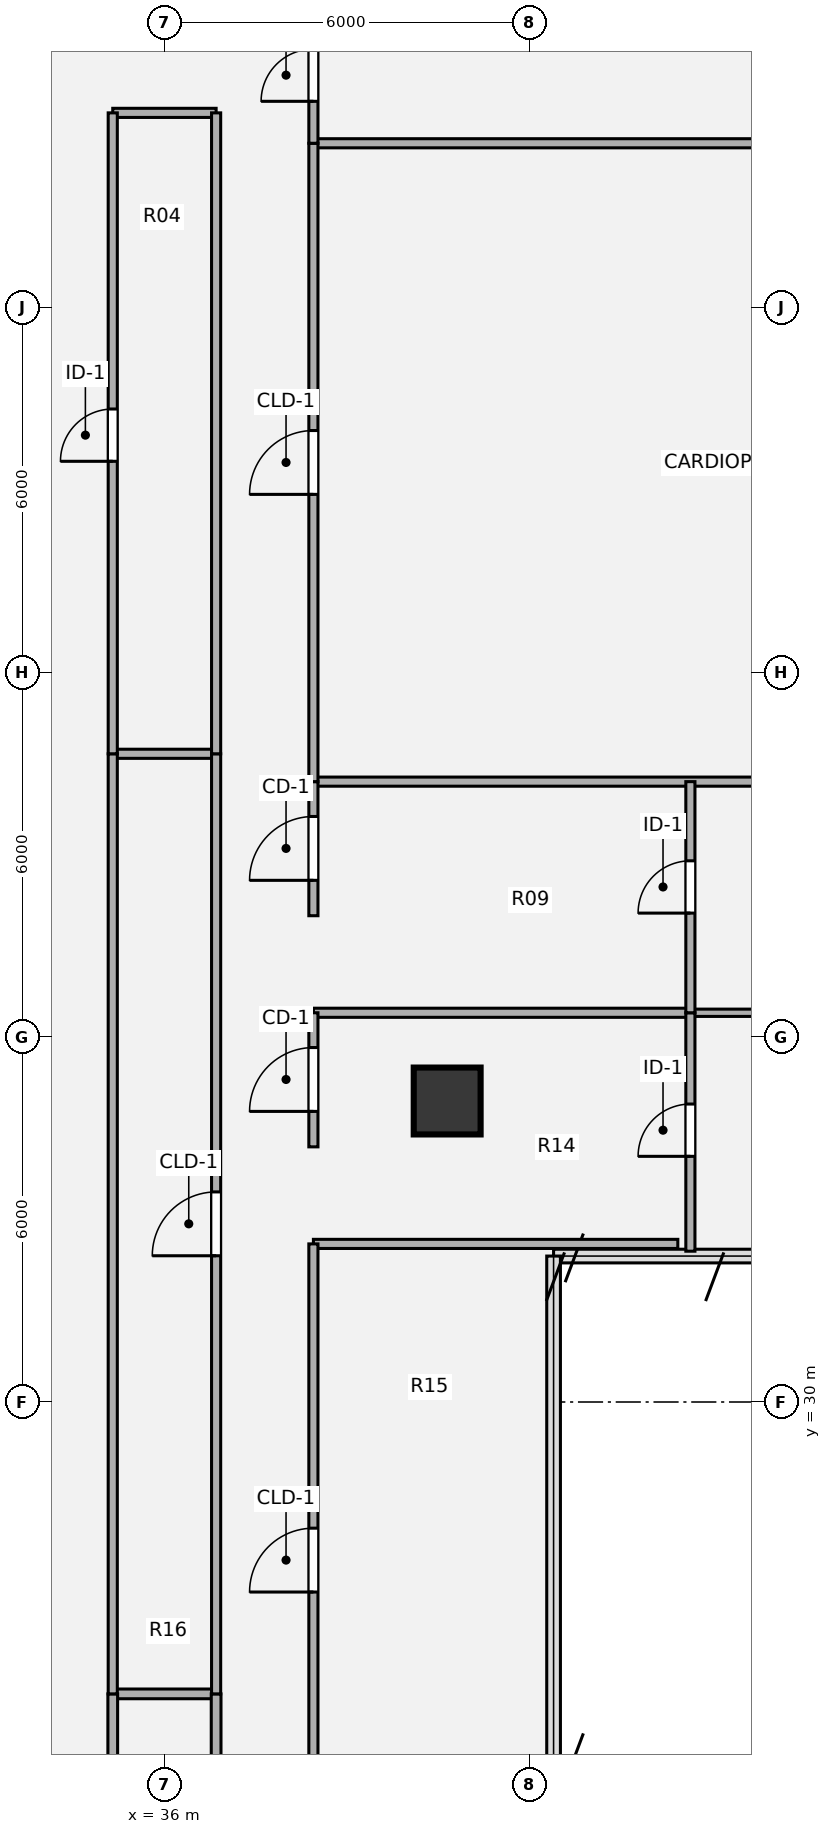
"""IFC4 building model, lengths in metres.
Left out: names, types, materials, properties, quantities, classifications, styles, units other than length and angle.
Written with IfcOpenShell. Run it as: python <this file> out.ifc"""

import sys

from ifc_helpers import new_model, si_unit, direction, frame, frame_2d, origin, origin_2d, place, context, subcontext, project, spatial, rectangle, hollow_circle, extrude, source, transform, mapped, element, fill, save


model = new_model("IFC4")
c1 = context("Model", 3, precision=1e-05, world=origin(), true_north=direction((0.0, 1.0)))
c2 = subcontext(c1, "Body", "Model", "MODEL_VIEW")
j1 = project(units=[si_unit("LENGTHUNIT", "METRE"), si_unit("PLANEANGLEUNIT", "RADIAN")], contexts=[c1])
p1 = place(None, origin())
s1 = spatial("IfcSite", under=j1, at=p1, CompositionType="ELEMENT")
p2 = place(p1, origin())
s2 = spatial("IfcBuilding", under=s1, at=p2, CompositionType="ELEMENT")
p3 = place(p2, frame((0.0, 0.0, 179.1)))
s3 = spatial("IfcBuildingStorey", under=s2, at=p3, CompositionType="ELEMENT", Elevation=179.1)
m1 = source(origin(), c2, "Body", "SweptSolid", [
    extrude(hollow_circle(Radius=0.55, WallThickness=0.04, at=origin_2d()), origin(), (0.0, 0.0, 1.0), 3.78),
])
p4 = place(p3, frame((40.65, 34.95, 0.0), z_axis=(0.0, 0.0, 1.0), x_axis=(1.0, 0.0, 0.0)))
e1 = element("IfcColumn", 1, at=p4, inside=s3, PredefinedType="COLUMN", context=c2, shape_type="MappedRepresentation", body=[
    mapped(m1, transform((0.0, 0.0, 0.0), x_axis=(1.0, 0.0, 0.0), y_axis=(0.0, 1.0, 0.0), z_axis=(0.0, 0.0, 1.0), scale=1.0)),
])
p5 = place(p3, frame((35.15, 25.2, 0.0), z_axis=(0.0, 0.0, 1.0), x_axis=(1.0, 0.0, 0.0)))
e2 = element("IfcWall", 2, at=p5, inside=s3, PredefinedType="PLUMBINGWALL", context=c2, shape_type="SweptSolid", body=[
    extrude(rectangle(XDim=1.7, YDim=0.16, at=frame_2d((0.85, 0.0))), origin(), (0.0, 0.0, 1.0), 3.5),
])
p6 = place(p3, frame((38.45, 32.6, 0.0), z_axis=(0.0, 0.0, 1.0), x_axis=(1.0, 0.0, 0.0)))
e3 = element("IfcWall", 3, at=p6, inside=s3, PredefinedType="PARTITIONING", context=c2, shape_type="SweptSolid", body=[
    extrude(rectangle(XDim=5.993, YDim=0.15, at=frame_2d((2.997, 0.0))), origin(), (0.0, 0.0, 1.0), 3.5),
])
p7 = place(p3, frame((38.45, 36.401, 0.0), z_axis=(0.0, 0.0, 1.0), x_axis=(1.0, 0.0, 0.0)))
e4 = element("IfcWall", 4, at=p7, inside=s3, PredefinedType="PARTITIONING", context=c2, shape_type="SweptSolid", body=[
    extrude(rectangle(XDim=6.2, YDim=0.15, at=frame_2d((3.1, 0.0))), origin(), (0.0, 0.0, 1.0), 2.982),
])
p8 = place(p3, frame((44.65, 36.401, 0.0), z_axis=(0.0, 0.0, 1.0), x_axis=(1.0, 0.0, 0.0)))
e5 = element("IfcWall", 5, at=p8, inside=s3, PredefinedType="PARTITIONING", context=c2, shape_type="SweptSolid", body=[
    extrude(rectangle(XDim=11.47, YDim=0.12, at=frame_2d((5.735, 0.0))), origin(), (0.0, 0.0, 1.0), 2.982),
])
p9 = place(p3, frame((38.45, 40.202, 0.0), z_axis=(0.0, 0.0, 1.0), x_axis=(1.0, 0.0, 0.0)))
e6 = element("IfcWall", 6, at=p9, inside=s3, PredefinedType="PARTITIONING", context=c2, shape_type="SweptSolid", body=[
    extrude(rectangle(XDim=17.67, YDim=0.15, at=frame_2d((8.835, 0.0))), origin(), (0.0, 0.0, 1.0), 2.982),
])
p10 = place(p3, frame((35.15, 40.66, 0.0), z_axis=(0.0, 0.0, 1.0), x_axis=(1.0, 0.0, 0.0)))
e7 = element("IfcWall", 7, at=p10, inside=s3, PredefinedType="PARTITIONING", context=c2, shape_type="SweptSolid", body=[
    extrude(rectangle(XDim=1.7, YDim=0.15, at=frame_2d((0.85, 0.0))), origin(), (0.0, 0.0, 1.0), 3.259),
])
p11 = place(p3, frame((38.45, 50.7, 0.0), z_axis=(0.0, 0.0, 1.0), x_axis=(1.0, 0.0, 0.0)))
e8 = element("IfcWall", 8, at=p11, inside=s3, PredefinedType="PARTITIONING", context=c2, shape_type="SweptSolid", body=[
    extrude(rectangle(XDim=17.569, YDim=0.15, at=frame_2d((8.785, 0.0))), origin(), (0.0, 0.0, 1.0), 3.308),
])
p12 = place(p3, frame((35.15, 51.2, 0.0), z_axis=(0.0, 0.0, 1.0), x_axis=(1.0, 0.0, 0.0)))
e9 = element("IfcWall", 9, at=p12, inside=s3, PredefinedType="PARTITIONING", context=c2, shape_type="SweptSolid", body=[
    extrude(rectangle(XDim=1.7, YDim=0.15, at=frame_2d((0.85, 0.0))), origin(), (0.0, 0.0, 1.0), 3.308),
])
p13 = place(p3, frame((35.15, 20.2, 0.0), z_axis=(0.0, 0.0, 1.0), x_axis=(0.0, 1.0, 0.0)))
e10 = element("IfcWall", 10, at=p13, inside=s3, PredefinedType="PLUMBINGWALL", context=c2, shape_type="SweptSolid", body=[
    extrude(rectangle(XDim=5.0, YDim=0.16, at=frame_2d((2.5, 0.0))), origin(), (0.0, 0.0, 1.0), 3.5),
])
p14 = place(p13, frame((2.07, 0.0, 0.0)))
e11 = element("IfcOpeningElement", 11, at=p14, cuts=e10, PredefinedType="OPENING", context=c2, shape_type="SweptSolid", body=[
    extrude(rectangle(XDim=0.86, YDim=2.1, at=origin_2d()), frame((0.43, 0.09, 1.05), z_axis=(0.0, -1.0, 0.0), x_axis=(1.0, 0.0, 0.0)), (0.0, 0.0, 1.0), 0.18),
])
p15 = place(p3, frame((35.15, 25.2, 0.0), z_axis=(0.0, 0.0, 1.0), x_axis=(0.0, 1.0, 0.0)))
e12 = element("IfcWall", 12, at=p15, inside=s3, PredefinedType="PARTITIONING", context=c2, shape_type="SweptSolid", body=[
    extrude(rectangle(XDim=15.46, YDim=0.15, at=frame_2d((7.73, 0.0))), origin(), (0.0, 0.0, 1.0), 3.5),
])
p16 = place(p3, frame((35.15, 40.66, 0.0), z_axis=(0.0, 0.0, 1.0), x_axis=(0.0, 1.0, 0.0)))
e13 = element("IfcWall", 13, at=p16, inside=s3, PredefinedType="PARTITIONING", context=c2, shape_type="SweptSolid", body=[
    extrude(rectangle(XDim=10.54, YDim=0.15, at=frame_2d((5.27, 0.0))), origin(), (0.0, 0.0, 1.0), 3.5),
])
p17 = place(p16, frame((4.81, 0.0, 0.0)))
e14 = element("IfcOpeningElement", 14, at=p17, cuts=e13, PredefinedType="OPENING", context=c2, shape_type="SweptSolid", body=[
    extrude(rectangle(XDim=0.86, YDim=2.1, at=origin_2d()), frame((0.43, 0.085, 1.05), z_axis=(0.0, -1.0, 0.0), x_axis=(1.0, 0.0, 0.0)), (0.0, 0.0, 1.0), 0.17),
])
p18 = place(p3, frame((36.85, 20.2, 0.0), z_axis=(0.0, 0.0, 1.0), x_axis=(0.0, 1.0, 0.0)))
e15 = element("IfcWall", 15, at=p18, inside=s3, PredefinedType="PLUMBINGWALL", context=c2, shape_type="SweptSolid", body=[
    extrude(rectangle(XDim=5.0, YDim=0.16, at=frame_2d((2.5, 0.0))), origin(), (0.0, 0.0, 1.0), 3.5),
])
p19 = place(p3, frame((36.85, 25.2, 0.0), z_axis=(0.0, 0.0, 1.0), x_axis=(0.0, 1.0, 0.0)))
e16 = element("IfcWall", 16, at=p19, inside=s3, PredefinedType="PARTITIONING", context=c2, shape_type="SweptSolid", body=[
    extrude(rectangle(XDim=15.46, YDim=0.15, at=frame_2d((7.73, 0.0))), origin(), (0.0, 0.0, 1.0), 3.5),
])
p20 = place(p19, frame((7.205, 0.0, 0.0)))
e17 = element("IfcOpeningElement", 17, at=p20, cuts=e16, PredefinedType="OPENING", context=c2, shape_type="SweptSolid", body=[
    extrude(rectangle(XDim=1.05, YDim=2.1, at=origin_2d()), frame((0.525, 0.085, 1.05), z_axis=(0.0, -1.0, 0.0), x_axis=(1.0, 0.0, 0.0)), (0.0, 0.0, 1.0), 0.17),
])
p21 = place(p3, frame((36.85, 40.66, 0.0), z_axis=(0.0, 0.0, 1.0), x_axis=(0.0, 1.0, 0.0)))
e18 = element("IfcWall", 18, at=p21, inside=s3, PredefinedType="PARTITIONING", context=c2, shape_type="SweptSolid", body=[
    extrude(rectangle(XDim=10.54, YDim=0.15, at=frame_2d((5.27, 0.0))), origin(), (0.0, 0.0, 1.0), 3.5),
])
p22 = place(p3, frame((38.45, 22.4, 0.0), z_axis=(0.0, 0.0, 1.0), x_axis=(0.0, 1.0, 0.0)))
e19 = element("IfcWall", 19, at=p22, inside=s3, PredefinedType="PARTITIONING", context=c2, shape_type="SweptSolid", body=[
    extrude(rectangle(XDim=10.2, YDim=0.15, at=frame_2d((5.1, 0.0))), origin(), (0.0, 0.0, 1.0), 3.5),
])
p23 = place(p22, frame((4.475, 0.0, 0.0)))
e20 = element("IfcOpeningElement", 20, at=p23, cuts=e19, PredefinedType="OPENING", context=c2, shape_type="SweptSolid", body=[
    extrude(rectangle(XDim=1.05, YDim=2.1, at=origin_2d()), frame((0.525, 0.085, 1.05), z_axis=(0.0, -1.0, 0.0), x_axis=(1.0, 0.0, 0.0)), (0.0, 0.0, 1.0), 0.17),
])
p24 = place(p3, frame((38.45, 34.196, 0.0), z_axis=(0.0, 0.0, 1.0), x_axis=(0.0, 1.0, 0.0)))
e21 = element("IfcWall", 21, at=p24, inside=s3, PredefinedType="PARTITIONING", context=c2, shape_type="SweptSolid", body=[
    extrude(rectangle(XDim=2.205, YDim=0.15, at=frame_2d((1.103, 0.0))), origin(), (0.0, 0.0, 1.0), 3.5),
])
p25 = place(p24, frame((0.583, 0.0, 0.0)))
e22 = element("IfcOpeningElement", 22, at=p25, cuts=e21, PredefinedType="OPENING", context=c2, shape_type="SweptSolid", body=[
    extrude(rectangle(XDim=1.05, YDim=2.1, at=origin_2d()), frame((0.525, 0.085, 1.05), z_axis=(0.0, -1.0, 0.0), x_axis=(1.0, 0.0, 0.0)), (0.0, 0.0, 1.0), 0.17),
])
p26 = place(p3, frame((38.45, 37.997, 0.0), z_axis=(0.0, 0.0, 1.0), x_axis=(0.0, 1.0, 0.0)))
e23 = element("IfcWall", 23, at=p26, inside=s3, PredefinedType="PARTITIONING", context=c2, shape_type="SweptSolid", body=[
    extrude(rectangle(XDim=2.205, YDim=0.15, at=frame_2d((1.103, 0.0))), origin(), (0.0, 0.0, 1.0), 3.5),
])
p27 = place(p26, frame((0.582, 0.0, 0.0)))
e24 = element("IfcOpeningElement", 24, at=p27, cuts=e23, PredefinedType="OPENING", context=c2, shape_type="SweptSolid", body=[
    extrude(rectangle(XDim=1.05, YDim=2.1, at=origin_2d()), frame((0.525, 0.085, 1.05), z_axis=(0.0, -1.0, 0.0), x_axis=(1.0, 0.0, 0.0)), (0.0, 0.0, 1.0), 0.17),
])
p28 = place(p3, frame((38.45, 40.202, 0.0), z_axis=(0.0, 0.0, 1.0), x_axis=(0.0, 1.0, 0.0)))
e25 = element("IfcWall", 25, at=p28, inside=s3, PredefinedType="PARTITIONING", context=c2, shape_type="SweptSolid", body=[
    extrude(rectangle(XDim=10.498, YDim=0.15, at=frame_2d((5.249, 0.0))), origin(), (0.0, 0.0, 1.0), 3.5),
])
p29 = place(p28, frame((4.724, 0.0, 0.0)))
e26 = element("IfcOpeningElement", 26, at=p29, cuts=e25, PredefinedType="OPENING", context=c2, shape_type="SweptSolid", body=[
    extrude(rectangle(XDim=1.05, YDim=2.1, at=origin_2d()), frame((0.525, 0.085, 1.05), z_axis=(0.0, -1.0, 0.0), x_axis=(1.0, 0.0, 0.0)), (0.0, 0.0, 1.0), 0.17),
])
p30 = place(p3, frame((38.45, 50.7, 0.0), z_axis=(0.0, 0.0, 1.0), x_axis=(0.0, 1.0, 0.0)))
e27 = element("IfcWall", 27, at=p30, inside=s3, PredefinedType="PARTITIONING", context=c2, shape_type="SweptSolid", body=[
    extrude(rectangle(XDim=2.3, YDim=0.15, at=frame_2d((1.15, 0.0))), origin(), (0.0, 0.0, 1.0), 3.5),
])
p31 = place(p30, frame((0.69, 0.0, 0.0)))
e28 = element("IfcOpeningElement", 28, at=p31, cuts=e27, PredefinedType="OPENING", context=c2, shape_type="SweptSolid", body=[
    extrude(rectangle(XDim=0.86, YDim=2.1, at=origin_2d()), frame((0.43, 0.085, 1.05), z_axis=(0.0, -1.0, 0.0), x_axis=(1.0, 0.0, 0.0)), (0.0, 0.0, 1.0), 0.17),
])
p32 = place(p3, frame((44.65, 32.48, 0.0), z_axis=(0.0, 0.0, 1.0), x_axis=(0.0, 1.0, 0.0)))
e29 = element("IfcWall", 29, at=p32, inside=s3, PredefinedType="PARTITIONING", context=c2, shape_type="SweptSolid", body=[
    extrude(rectangle(XDim=3.921, YDim=0.15, at=frame_2d((1.96, 0.0))), origin(), (0.0, 0.0, 1.0), 3.5),
])
p33 = place(p32, frame((1.56, 0.0, 0.0)))
e30 = element("IfcOpeningElement", 30, at=p33, cuts=e29, PredefinedType="OPENING", context=c2, shape_type="SweptSolid", body=[
    extrude(rectangle(XDim=0.86, YDim=2.1, at=origin_2d()), frame((0.43, 0.085, 1.05), z_axis=(0.0, -1.0, 0.0), x_axis=(1.0, 0.0, 0.0)), (0.0, 0.0, 1.0), 0.17),
])
p34 = place(p3, frame((44.65, 36.401, 0.0), z_axis=(0.0, 0.0, 1.0), x_axis=(0.0, 1.0, 0.0)))
e31 = element("IfcWall", 31, at=p34, inside=s3, PredefinedType="PARTITIONING", context=c2, shape_type="SweptSolid", body=[
    extrude(rectangle(XDim=3.801, YDim=0.15, at=frame_2d((1.9, 0.0))), origin(), (0.0, 0.0, 1.0), 3.5),
])
p35 = place(p34, frame((1.639, 0.0, 0.0)))
e32 = element("IfcOpeningElement", 32, at=p35, cuts=e31, PredefinedType="OPENING", context=c2, shape_type="SweptSolid", body=[
    extrude(rectangle(XDim=0.86, YDim=2.1, at=origin_2d()), frame((0.43, 0.085, 1.05), z_axis=(0.0, -1.0, 0.0), x_axis=(1.0, 0.0, 0.0)), (0.0, 0.0, 1.0), 0.17),
])
m2 = source(origin(), c2, "Body", "SweptSolid", [
    extrude(rectangle(XDim=0.86, YDim=2.1, at=origin_2d()), frame((0.43, 0.025, 1.05), z_axis=(0.0, -1.0, 0.0), x_axis=(1.0, 0.0, 0.0)), (0.0, 0.0, 1.0), 0.05),
])
p36 = place(p17, origin())
e33 = element("IfcDoor", 33, at=p36, inside=s3, OperationType="SINGLE_SWING_LEFT", PredefinedType="DOOR", context=c2, shape_type="MappedRepresentation", body=[
    mapped(m2, transform((0.0, 0.0, 0.0), x_axis=(1.0, 0.0, 0.0), y_axis=(0.0, 1.0, 0.0), z_axis=(0.0, 0.0, 1.0), scale=1.0)),
])
fill(e14, e33)
m3 = source(origin(), c2, "Body", "SweptSolid", [
    extrude(rectangle(XDim=1.05, YDim=2.1, at=origin_2d()), frame((0.525, 0.025, 1.05), z_axis=(0.0, -1.0, 0.0), x_axis=(1.0, 0.0, 0.0)), (0.0, 0.0, 1.0), 0.05),
])
p37 = place(p20, origin())
e34 = element("IfcDoor", 34, at=p37, inside=s3, OperationType="SINGLE_SWING_LEFT", PredefinedType="DOOR", context=c2, shape_type="MappedRepresentation", body=[
    mapped(m3, transform((0.0, 0.0, 0.0), x_axis=(1.0, 0.0, 0.0), y_axis=(0.0, 1.0, 0.0), z_axis=(0.0, 0.0, 1.0), scale=1.0)),
])
fill(e17, e34)
p38 = place(p23, origin())
e35 = element("IfcDoor", 35, at=p38, inside=s3, OperationType="SINGLE_SWING_LEFT", PredefinedType="DOOR", context=c2, shape_type="MappedRepresentation", body=[
    mapped(m3, transform((0.0, 0.0, 0.0), x_axis=(1.0, 0.0, 0.0), y_axis=(0.0, 1.0, 0.0), z_axis=(0.0, 0.0, 1.0), scale=1.0)),
])
fill(e20, e35)
m4 = source(origin(), c2, "Body", "SweptSolid", [
    extrude(rectangle(XDim=1.05, YDim=2.1, at=origin_2d()), frame((0.525, 0.025, 1.05), z_axis=(0.0, -1.0, 0.0), x_axis=(1.0, 0.0, 0.0)), (0.0, 0.0, 1.0), 0.05),
])
p39 = place(p25, origin())
e36 = element("IfcDoor", 36, at=p39, inside=s3, OperationType="SINGLE_SWING_LEFT", PredefinedType="DOOR", context=c2, shape_type="MappedRepresentation", body=[
    mapped(m4, transform((0.0, 0.0, 0.0), x_axis=(1.0, 0.0, 0.0), y_axis=(0.0, 1.0, 0.0), z_axis=(0.0, 0.0, 1.0), scale=1.0)),
])
fill(e22, e36)
p40 = place(p27, origin())
e37 = element("IfcDoor", 37, at=p40, inside=s3, OperationType="SINGLE_SWING_LEFT", PredefinedType="DOOR", context=c2, shape_type="MappedRepresentation", body=[
    mapped(m4, transform((0.0, 0.0, 0.0), x_axis=(1.0, 0.0, 0.0), y_axis=(0.0, 1.0, 0.0), z_axis=(0.0, 0.0, 1.0), scale=1.0)),
])
fill(e24, e37)
p41 = place(p29, origin())
e38 = element("IfcDoor", 38, at=p41, inside=s3, OperationType="SINGLE_SWING_LEFT", PredefinedType="DOOR", context=c2, shape_type="MappedRepresentation", body=[
    mapped(m3, transform((0.0, 0.0, 0.0), x_axis=(1.0, 0.0, 0.0), y_axis=(0.0, 1.0, 0.0), z_axis=(0.0, 0.0, 1.0), scale=1.0)),
])
fill(e26, e38)
p42 = place(p31, origin())
e39 = element("IfcDoor", 39, at=p42, inside=s3, OperationType="SINGLE_SWING_LEFT", PredefinedType="DOOR", context=c2, shape_type="MappedRepresentation", body=[
    mapped(m2, transform((0.0, 0.0, 0.0), x_axis=(1.0, 0.0, 0.0), y_axis=(0.0, 1.0, 0.0), z_axis=(0.0, 0.0, 1.0), scale=1.0)),
])
fill(e28, e39)
p43 = place(p33, origin())
e40 = element("IfcDoor", 40, at=p43, inside=s3, OperationType="SINGLE_SWING_LEFT", PredefinedType="DOOR", context=c2, shape_type="MappedRepresentation", body=[
    mapped(m2, transform((0.0, 0.0, 0.0), x_axis=(1.0, 0.0, 0.0), y_axis=(0.0, 1.0, 0.0), z_axis=(0.0, 0.0, 1.0), scale=1.0)),
])
fill(e30, e40)
p44 = place(p35, origin())
e41 = element("IfcDoor", 41, at=p44, inside=s3, OperationType="SINGLE_SWING_LEFT", PredefinedType="DOOR", context=c2, shape_type="MappedRepresentation", body=[
    mapped(m2, transform((0.0, 0.0, 0.0), x_axis=(1.0, 0.0, 0.0), y_axis=(0.0, 1.0, 0.0), z_axis=(0.0, 0.0, 1.0), scale=1.0)),
])
fill(e32, e41)
save(model, sys.argv[1])
